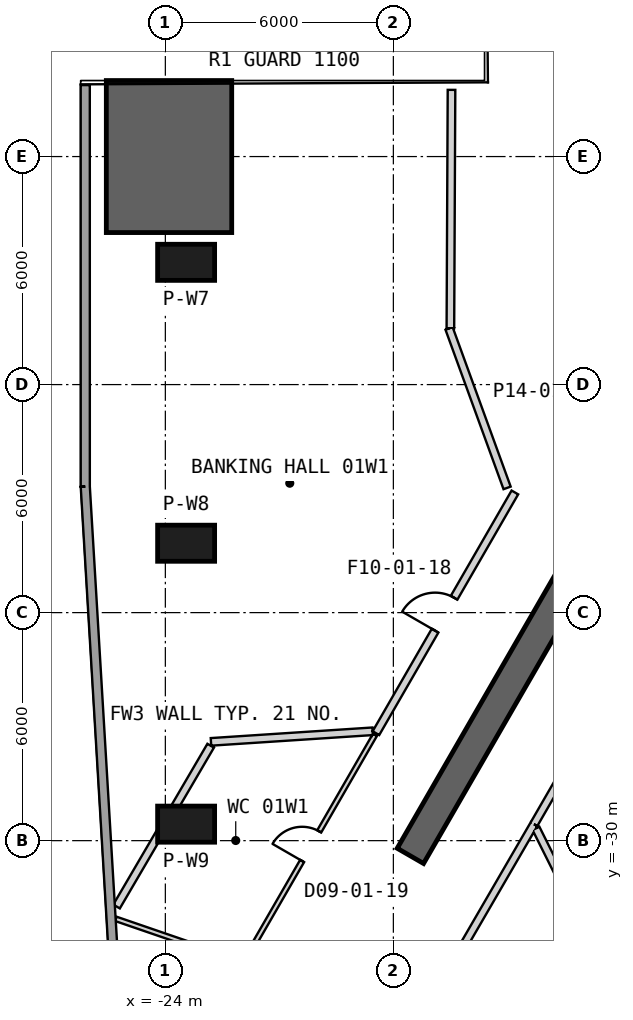
"""IFC4 building model, lengths in metres.
Left out: names, types, materials, properties, quantities, classifications, styles, units other than length and angle.
Written with IfcOpenShell. Run it as: python <this file> out.ifc"""

import sys

from ifc_helpers import new_model, si_unit, direction, frame, frame_2d, origin, origin_2d, place, context, subcontext, project, spatial, polyline, rectangle, outline, extrude, element, fill, save


model = new_model("IFC4")
c1 = context("Model", 3, precision=1e-05, world=origin(), true_north=direction((0.0, 1.0)))
c2 = subcontext(c1, "Body", "Model", "MODEL_VIEW")
j1 = project(units=[si_unit("LENGTHUNIT", "METRE"), si_unit("PLANEANGLEUNIT", "RADIAN")], contexts=[c1])
p1 = place(None, origin())
s1 = spatial("IfcSite", under=j1, at=p1, CompositionType="ELEMENT")
p2 = place(p1, origin())
s2 = spatial("IfcBuilding", under=s1, at=p2, CompositionType="ELEMENT")
p3 = place(p2, frame((0.0, 0.0, 9.0)))
s3 = spatial("IfcBuildingStorey", under=s2, at=p3, CompositionType="ELEMENT", Elevation=9.0)
for number, where, z_axis, x_axis in (
    (1, (-23.453, -14.783, 0.0), (0.0, 0.0, 1.0), (-1.0, 0.0, 0.0)),
    (2, (-23.453, -22.174, 0.0), (0.0, 0.0, 1.0), (-1.0, 0.0, 0.0)),
    (3, (-23.453, -29.566, 0.0), (0.0, 0.0, 1.0), (-1.0, 0.0, 0.0)),
):
    element("IfcColumn", number, at=place(p3, frame(where, z_axis=z_axis, x_axis=x_axis)), inside=s3, PredefinedType="COLUMN", context=c2, shape_type="SweptSolid", body=[
        extrude(rectangle(XDim=1.5, YDim=0.95, at=origin_2d()), origin(), (0.0, 0.0, 1.0), 6.5),
    ])
p4 = place(p3, frame((-10.575, -18.316, 0.0), z_axis=(0.0, 0.0, 1.0), x_axis=(-0.499996575515, -0.866027380903, 0.0)))
e4 = element("IfcWall", 4, at=p4, inside=s3, PredefinedType="SHEAR", context=c2, shape_type="SweptSolid", body=[
    extrude(rectangle(XDim=13.954, YDim=0.8, at=frame_2d((6.977, 0.0))), origin(), (0.0, 0.0, 1.0), 6.5),
])
p5 = place(p4, frame((2.05, 0.0, 0.0)))
e5 = element("IfcOpeningElement", 5, at=p5, cuts=e4, PredefinedType="OPENING", context=c2, shape_type="SweptSolid", body=[
    extrude(rectangle(XDim=1.4, YDim=2.4, at=frame_2d((0.7, 1.2))), frame((0.0, 0.41, 0.0), z_axis=(0.0, -1.0, 0.0), x_axis=(1.0, 0.0, 0.0)), (0.0, 0.0, 1.0), 0.82),
])
p6 = place(p3, origin())
e6 = element("IfcWall", 6, at=p6, inside=s3, PredefinedType="SHEAR", context=c2, shape_type="SweptSolid", body=[
    extrude(outline(polyline([(-25.553, -10.0), (-25.553, -14.0), (-22.253, -14.0), (-22.253, -10.0), (-25.553, -10.0)])), origin(), (0.0, 0.0, 1.0), 6.5),
])
p7 = place(p3, frame((-26.108, -10.119, 0.0), z_axis=(0.0, 0.0, 1.0), x_axis=(6.9319284e-05, -0.999999997597, 0.0)))
e7 = element("IfcWall", 7, at=p7, inside=s3, PredefinedType="SOLIDWALL", context=c2, shape_type="SweptSolid", body=[
    extrude(rectangle(XDim=10.566, YDim=0.24, at=frame_2d((5.283, 0.0))), origin(), (0.0, 0.0, 1.0), 6.2),
])
p8 = place(p3, frame((-26.107, -20.685, 0.0), z_axis=(0.0, 0.0, 1.0), x_axis=(0.059596169304, -0.998222568671, 0.0)))
e8 = element("IfcWall", 8, at=p8, inside=s3, PredefinedType="SOLIDWALL", context=c2, shape_type="SweptSolid", body=[
    extrude(rectangle(XDim=13.801, YDim=0.24, at=frame_2d((6.901, 0.0))), origin(), (0.0, 0.0, 1.0), 6.2),
])
p9 = place(p3, frame((-18.459, -27.172, 0.0), z_axis=(0.0, 0.0, 1.0), x_axis=(0.49998445949, 0.866034375916, 0.0)))
e9 = element("IfcWall", 9, at=p9, inside=s3, PredefinedType="PARTITIONING", context=c2, shape_type="SweptSolid", body=[
    extrude(rectangle(XDim=7.313, YDim=0.2, at=frame_2d((3.657, 0.0))), origin(), (0.0, 0.0, 1.0), 6.2),
])
p10 = place(p9, frame((3.115, 0.0, 0.0)))
e10 = element("IfcOpeningElement", 10, at=p10, cuts=e9, PredefinedType="OPENING", context=c2, shape_type="SweptSolid", body=[
    extrude(rectangle(XDim=1.0, YDim=2.1, at=frame_2d((0.5, 1.05))), frame((0.0, 0.11, 0.0), z_axis=(0.0, -1.0, 0.0), x_axis=(1.0, 0.0, 0.0)), (0.0, 0.0, 1.0), 0.22),
])
p11 = place(p3, frame((-16.534, -16.523, 0.0), z_axis=(0.0, 0.0, 1.0), x_axis=(0.34204600053, -0.93968320913, 0.0)))
e11 = element("IfcWall", 11, at=p11, inside=s3, PredefinedType="PARTITIONING", context=c2, shape_type="SweptSolid", body=[
    extrude(rectangle(XDim=4.465, YDim=0.2, at=frame_2d((2.232, 0.0))), origin(), (0.0, 0.0, 1.0), 5.28),
])
p12 = place(p3, frame((-16.47, -10.245, 0.0), z_axis=(0.0, 0.0, 1.0), x_axis=(-0.004710134991, -0.999988907253, 0.0)))
e12 = element("IfcWall", 12, at=p12, inside=s3, PredefinedType="PARTITIONING", context=c2, shape_type="SweptSolid", body=[
    extrude(rectangle(XDim=6.272, YDim=0.2, at=frame_2d((3.136, 0.0))), origin(), (0.0, 0.0, 1.0), 5.38),
])
p13 = place(p3, frame((-21.943, -33.206, 0.0), z_axis=(0.0, 0.0, 1.0), x_axis=(0.500001642027, 0.866024455758, 0.0)))
e13 = element("IfcWall", 13, at=p13, inside=s3, PredefinedType="PARTITIONING", context=c2, shape_type="SweptSolid", body=[
    extrude(rectangle(XDim=6.914, YDim=0.12, at=frame_2d((3.457, 0.0))), origin(), (0.0, 0.0, 1.0), 6.2),
])
p14 = place(p13, frame((3.084, 0.0, 0.0)))
e14 = element("IfcOpeningElement", 14, at=p14, cuts=e13, PredefinedType="OPENING", context=c2, shape_type="SweptSolid", body=[
    extrude(rectangle(XDim=0.9, YDim=2.1, at=frame_2d((0.45, 1.05))), frame((0.0, 0.07, 0.0), z_axis=(0.0, -1.0, 0.0), x_axis=(1.0, 0.0, 0.0)), (0.0, 0.0, 1.0), 0.14),
])
p15 = place(p3, frame((-22.799, -27.401, 0.0), z_axis=(0.0, 0.0, 1.0), x_axis=(0.997858297663, 0.065412672977, 0.0)))
e15 = element("IfcWall", 15, at=p15, inside=s3, PredefinedType="PARTITIONING", context=c2, shape_type="SweptSolid", body=[
    extrude(rectangle(XDim=4.262, YDim=0.2, at=frame_2d((2.131, 0.0))), origin(), (0.0, 0.0, 1.0), 5.28),
])
p16 = place(p3, frame((-25.284, -31.733, 0.0), z_axis=(0.0, 0.0, 1.0), x_axis=(0.505158397, 0.863026647295, 0.0)))
e16 = element("IfcWall", 16, at=p16, inside=s3, PredefinedType="PARTITIONING", context=c2, shape_type="SweptSolid", body=[
    extrude(rectangle(XDim=4.903, YDim=0.2, at=frame_2d((2.452, 0.0))), origin(), (0.0, 0.0, 1.0), 6.2),
])
p17 = place(p3, frame((-25.303, -32.058, 0.0), z_axis=(0.0, 0.0, 1.0), x_axis=(0.945753144858, -0.324886116956, 0.0)))
e17 = element("IfcWall", 17, at=p17, inside=s3, PredefinedType="PARTITIONING", context=c2, shape_type="SweptSolid", body=[
    extrude(rectangle(XDim=3.488, YDim=0.12, at=frame_2d((1.744, 0.0))), origin(), (0.0, 0.0, 1.0), 6.2),
])
p18 = place(p3, frame((-14.3, -29.568, 0.0), z_axis=(0.0, 0.0, 1.0), x_axis=(-0.502133484881, -0.864790126772, 0.0)))
e18 = element("IfcWall", 18, at=p18, inside=s3, PredefinedType="PARTITIONING", context=c2, shape_type="SweptSolid", body=[
    extrude(rectangle(XDim=11.591, YDim=0.2, at=frame_2d((5.795, 0.0))), origin(), (0.0, 0.0, 1.0), 6.2),
])
p19 = place(p18, frame((5.25, 0.0, 0.0)))
e19 = element("IfcOpeningElement", 19, at=p19, cuts=e18, PredefinedType="OPENING", context=c2, shape_type="SweptSolid", body=[
    extrude(rectangle(XDim=1.0, YDim=2.1, at=frame_2d((0.5, 1.05))), frame((0.0, 0.11, 0.0), z_axis=(0.0, -1.0, 0.0), x_axis=(1.0, 0.0, 0.0)), (0.0, 0.0, 1.0), 0.22),
])
p20 = place(p3, frame((-10.644, -23.238, 0.0), z_axis=(0.0, 0.0, 1.0), x_axis=(-0.500076141041, -0.865981439271, 0.0)))
e20 = element("IfcWall", 20, at=p20, inside=s3, PredefinedType="PARTITIONING", context=c2, shape_type="SweptSolid", body=[
    extrude(rectangle(XDim=7.309, YDim=0.2, at=frame_2d((3.655, 0.0))), origin(), (0.0, 0.0, 1.0), 6.2),
])
p21 = place(p20, frame((3.096, 0.0, 0.0)))
e21 = element("IfcOpeningElement", 21, at=p21, cuts=e20, PredefinedType="OPENING", context=c2, shape_type="SweptSolid", body=[
    extrude(rectangle(XDim=1.0, YDim=2.1, at=frame_2d((0.5, 1.05))), frame((0.0, 0.11, 0.0), z_axis=(0.0, -1.0, 0.0), x_axis=(1.0, 0.0, 0.0)), (0.0, 0.0, 1.0), 0.22),
])
p22 = place(p3, frame((-14.248, -29.677, 0.0), z_axis=(0.0, 0.0, 1.0), x_axis=(0.447311167727, -0.894378398233, 0.0)))
e22 = element("IfcWall", 22, at=p22, inside=s3, PredefinedType="PARTITIONING", context=c2, shape_type="SweptSolid", body=[
    extrude(rectangle(XDim=7.006, YDim=0.2, at=frame_2d((3.503, 0.0))), origin(), (0.0, 0.0, 1.0), 5.28),
])
p23 = place(p10, origin())
e23 = element("IfcDoor", 23, at=p23, inside=s3, OperationType="SINGLE_SWING_LEFT", PredefinedType="USERDEFINED", context=c2, shape_type="SweptSolid", body=[
    extrude(rectangle(XDim=1.0, YDim=2.1, at=frame_2d((0.5, 1.05))), frame((0.0, 0.025, 0.0), z_axis=(0.0, -1.0, 0.0), x_axis=(1.0, 0.0, 0.0)), (0.0, 0.0, 1.0), 0.05),
])
fill(e10, e23)
p24 = place(p14, origin())
e24 = element("IfcDoor", 24, at=p24, inside=s3, OperationType="SINGLE_SWING_LEFT", PredefinedType="NOTDEFINED", context=c2, shape_type="SweptSolid", body=[
    extrude(rectangle(XDim=0.9, YDim=2.1, at=frame_2d((0.45, 1.05))), frame((0.0, 0.025, 0.0), z_axis=(0.0, -1.0, 0.0), x_axis=(1.0, 0.0, 0.0)), (0.0, 0.0, 1.0), 0.05),
])
fill(e14, e24)
save(model, sys.argv[1])
